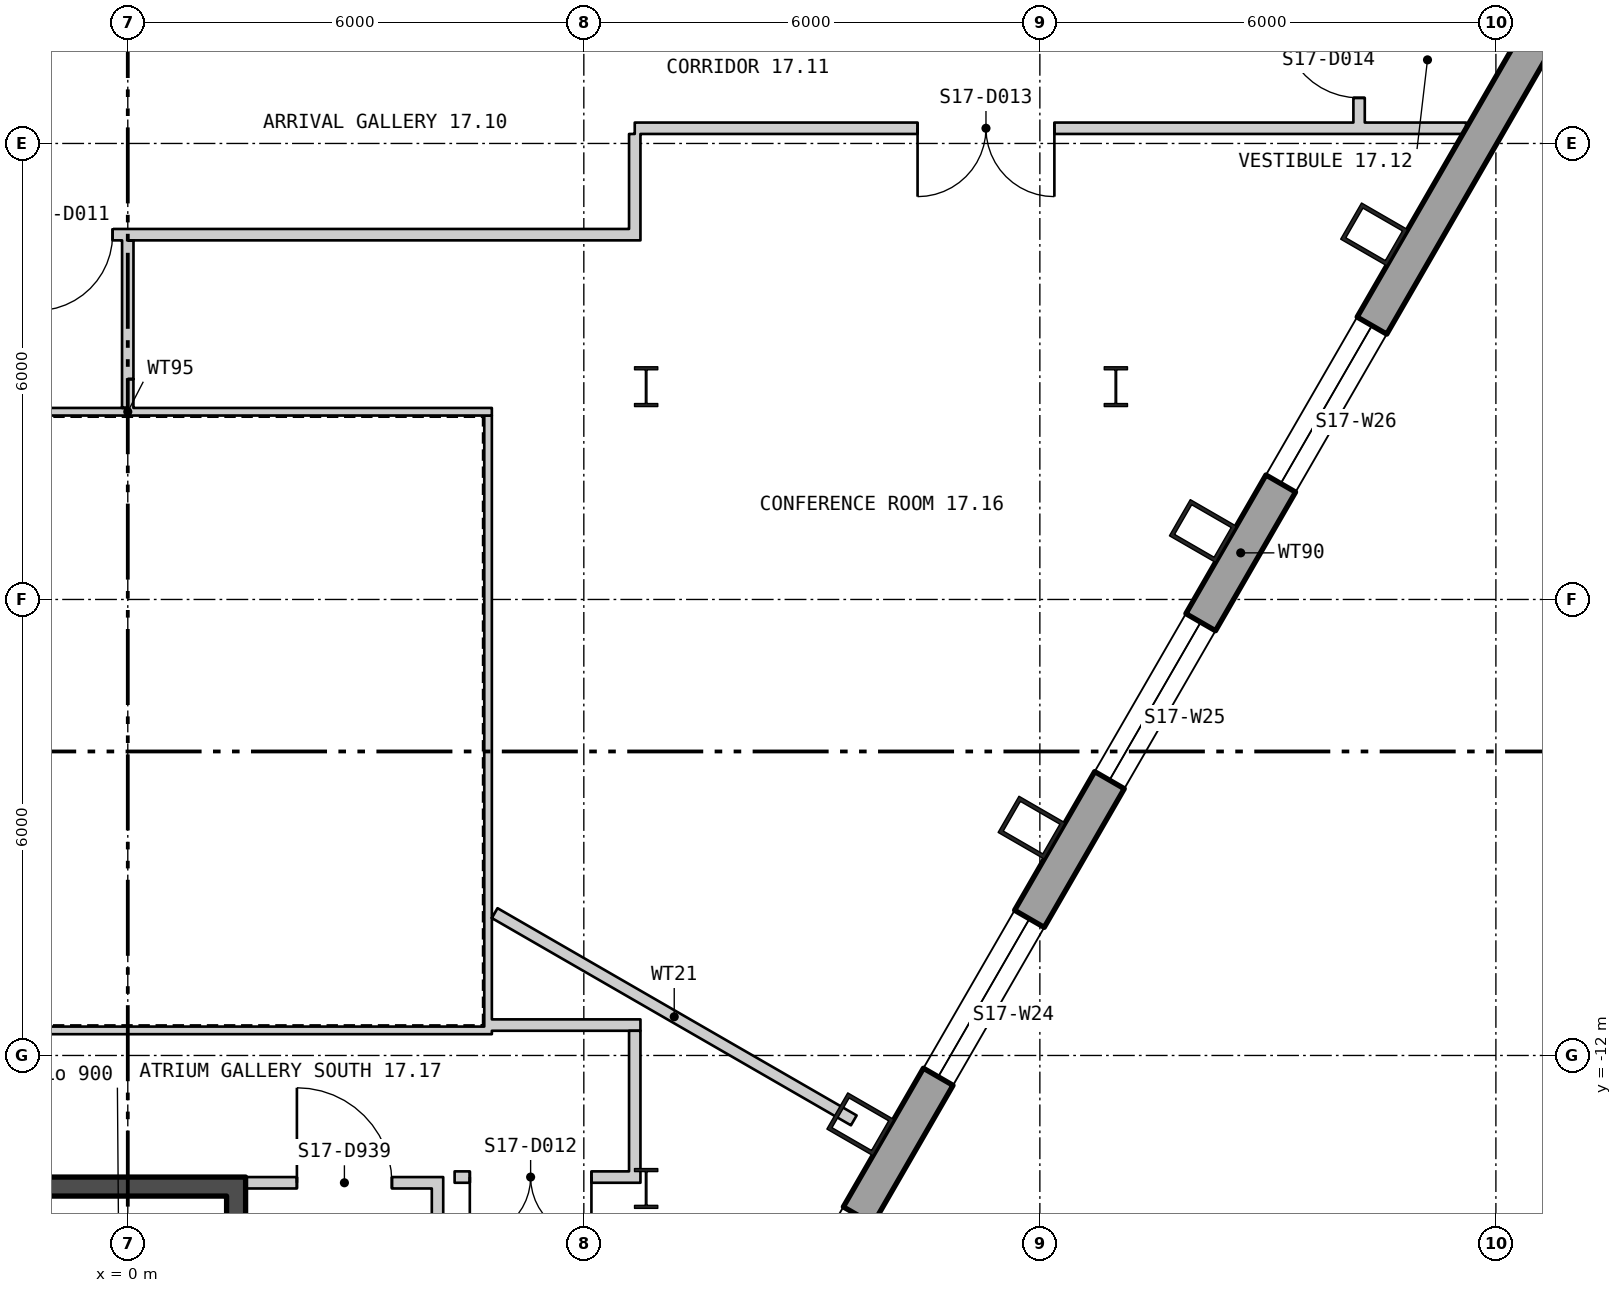
"""IFC4 building model, lengths in metres.
Left out: names, types, materials, properties, quantities, classifications, styles, units other than length and angle.
Written with IfcOpenShell. Run it as: python <this file> out.ifc"""

import sys

from ifc_helpers import new_model, si_unit, direction, frame, frame_2d, origin, origin_2d, place, context, subcontext, project, spatial, polyline, rectangle, hollow_rectangle, i_section, outline, extrude, element, fill, save


model = new_model("IFC4")
c1 = context("Model", 3, precision=1e-05, world=origin(), true_north=direction((0.0, 1.0)))
c2 = subcontext(c1, "Body", "Model", "MODEL_VIEW")
j1 = project(units=[si_unit("LENGTHUNIT", "METRE"), si_unit("PLANEANGLEUNIT", "RADIAN")], contexts=[c1])
p1 = place(None, origin())
s1 = spatial("IfcSite", under=j1, at=p1, CompositionType="ELEMENT")
p2 = place(p1, origin())
s2 = spatial("IfcBuilding", under=s1, at=p2, CompositionType="ELEMENT")
p3 = place(p2, frame((0.0, 0.0, 227.7)))
s3 = spatial("IfcBuildingStorey", under=s2, at=p3, CompositionType="ELEMENT", Elevation=227.7)
for number, where, z_axis, x_axis in (
    (1, (9.638, -12.905, 0.0), (0.0, 0.0, 1.0), (0.5, 0.866, 0.0)),
    (2, (11.891, -9.002, 0.0), (0.0, 0.0, 1.0), (0.5, 0.866, 0.0)),
    (3, (14.145, -5.099, 0.0), (0.0, 0.0, 1.0), (0.5, 0.866, 0.0)),
    (4, (16.398, -1.196, 0.0), (0.0, 0.0, 1.0), (0.5, 0.866, 0.0)),
):
    element("IfcColumn", number, at=place(p3, frame(where, z_axis=z_axis, x_axis=x_axis)), inside=s3, PredefinedType="COLUMN", context=c2, shape_type="SweptSolid", body=[
        extrude(hollow_rectangle(XDim=0.55, YDim=0.7, WallThickness=0.05, at=origin_2d()), origin(), (0.0, 0.0, 1.0), 3.9),
    ])
for number, where, z_axis, x_axis in (
    (5, (6.82, -3.2, 0.0), (0.0, 0.0, 1.0), (1.0, 0.0, 0.0)),
    (6, (6.82, -13.75, 0.0), (0.0, 0.0, 1.0), (1.0, 0.0, 0.0)),
    (7, (13.0, -3.2, 0.0), (0.0, 0.0, 1.0), (1.0, 0.0, 0.0)),
):
    element("IfcColumn", number, at=place(p3, frame(where, z_axis=z_axis, x_axis=x_axis)), inside=s3, PredefinedType="COLUMN", context=c2, shape_type="SweptSolid", body=[
        extrude(i_section(OverallWidth=0.306, OverallDepth=0.524, WebThickness=0.021, FlangeThickness=0.04, at=origin_2d()), origin(), (0.0, 0.0, 1.0), 3.9),
    ])
p4 = place(p3, frame((3.21, -25.189, -0.18), z_axis=(0.0, 0.0, 1.0), x_axis=(0.499999194392, 0.866025868902, 0.0)))
e8 = element("IfcWall", 8, at=p4, inside=s3, PredefinedType="SOLIDWALL", context=c2, shape_type="SweptSolid", body=[
    extrude(outline(polyline([(-0.13, -0.225), (45.86, -0.225), (45.6, 0.225), (0.13, 0.225), (-0.13, -0.225)])), origin(), (0.0, 0.0, 1.0), 3.68),
])
p5 = place(p4, frame((1.424, 0.0, 1.08)))
e9 = element("IfcOpeningElement", 9, at=p5, cuts=e8, PredefinedType="OPENING", context=c2, shape_type="SweptSolid", body=[
    extrude(rectangle(XDim=2.4, YDim=2.0, at=frame_2d((1.2, 1.0))), frame((0.0, 0.235, 0.0), z_axis=(0.0, -1.0, 0.0), x_axis=(1.0, 0.0, 0.0)), (0.0, 0.0, 1.0), 0.47),
])
p6 = place(p4, frame((5.892, 0.0, 1.08)))
e10 = element("IfcOpeningElement", 10, at=p6, cuts=e8, PredefinedType="OPENING", context=c2, shape_type="SweptSolid", body=[
    extrude(rectangle(XDim=2.4, YDim=2.0, at=frame_2d((1.2, 1.0))), frame((0.0, 0.235, 0.0), z_axis=(0.0, -1.0, 0.0), x_axis=(1.0, 0.0, 0.0)), (0.0, 0.0, 1.0), 0.47),
])
p7 = place(p4, frame((10.399, 0.0, 1.08)))
e11 = element("IfcOpeningElement", 11, at=p7, cuts=e8, PredefinedType="OPENING", context=c2, shape_type="SweptSolid", body=[
    extrude(rectangle(XDim=2.4, YDim=2.0, at=frame_2d((1.2, 1.0))), frame((0.0, 0.235, 0.0), z_axis=(0.0, -1.0, 0.0), x_axis=(1.0, 0.0, 0.0)), (0.0, 0.0, 1.0), 0.47),
])
p8 = place(p4, frame((14.905, 0.0, 1.08)))
e12 = element("IfcOpeningElement", 12, at=p8, cuts=e8, PredefinedType="OPENING", context=c2, shape_type="SweptSolid", body=[
    extrude(rectangle(XDim=2.4, YDim=2.0, at=frame_2d((1.2, 1.0))), frame((0.0, 0.235, 0.0), z_axis=(0.0, -1.0, 0.0), x_axis=(1.0, 0.0, 0.0)), (0.0, 0.0, 1.0), 0.47),
])
p9 = place(p4, frame((19.412, 0.0, 1.08)))
e13 = element("IfcOpeningElement", 13, at=p9, cuts=e8, PredefinedType="OPENING", context=c2, shape_type="SweptSolid", body=[
    extrude(rectangle(XDim=2.4, YDim=2.0, at=frame_2d((1.2, 1.0))), frame((0.0, 0.235, 0.0), z_axis=(0.0, -1.0, 0.0), x_axis=(1.0, 0.0, 0.0)), (0.0, 0.0, 1.0), 0.47),
])
p10 = place(p4, frame((23.918, 0.0, 1.08)))
e14 = element("IfcOpeningElement", 14, at=p10, cuts=e8, PredefinedType="OPENING", context=c2, shape_type="SweptSolid", body=[
    extrude(rectangle(XDim=2.4, YDim=2.0, at=frame_2d((1.2, 1.0))), frame((0.0, 0.235, 0.0), z_axis=(0.0, -1.0, 0.0), x_axis=(1.0, 0.0, 0.0)), (0.0, 0.0, 1.0), 0.47),
])
p11 = place(p4, frame((32.932, 0.0, 1.08)))
e15 = element("IfcOpeningElement", 15, at=p11, cuts=e8, PredefinedType="OPENING", context=c2, shape_type="SweptSolid", body=[
    extrude(rectangle(XDim=2.4, YDim=2.0, at=frame_2d((1.2, 1.0))), frame((0.0, 0.235, 0.0), z_axis=(0.0, -1.0, 0.0), x_axis=(1.0, 0.0, 0.0)), (0.0, 0.0, 1.0), 0.47),
])
p12 = place(p4, frame((37.438, 0.0, 1.08)))
e16 = element("IfcOpeningElement", 16, at=p12, cuts=e8, PredefinedType="OPENING", context=c2, shape_type="SweptSolid", body=[
    extrude(rectangle(XDim=2.4, YDim=2.0, at=frame_2d((1.2, 1.0))), frame((0.0, 0.235, 0.0), z_axis=(0.0, -1.0, 0.0), x_axis=(1.0, 0.0, 0.0)), (0.0, 0.0, 1.0), 0.47),
])
p13 = place(p4, frame((41.907, 0.0, 1.08)))
e17 = element("IfcOpeningElement", 17, at=p13, cuts=e8, PredefinedType="OPENING", context=c2, shape_type="SweptSolid", body=[
    extrude(rectangle(XDim=2.4, YDim=2.0, at=frame_2d((1.2, 1.0))), frame((0.0, 0.235, 0.0), z_axis=(0.0, -1.0, 0.0), x_axis=(1.0, 0.0, 0.0)), (0.0, 0.0, 1.0), 0.47),
])
p14 = place(p3, frame((-4.79, -11.67, 0.0), z_axis=(0.0, 0.0, 1.0), x_axis=(1.0, 0.0, 0.0)))
e18 = element("IfcWall", 18, at=p14, inside=s3, PredefinedType="PARTITIONING", context=c2, shape_type="SweptSolid", body=[
    extrude(rectangle(XDim=9.58, YDim=0.1, at=frame_2d((4.79, 0.0))), origin(), (0.0, 0.0, 1.0), 3.7),
])
p15 = place(p3, frame((4.74, -11.62, 0.0), z_axis=(0.0, 0.0, 1.0), x_axis=(0.0, 1.0, 0.0)))
e19 = element("IfcWall", 19, at=p15, inside=s3, PredefinedType="PARTITIONING", context=c2, shape_type="SweptSolid", body=[
    extrude(rectangle(XDim=8.04, YDim=0.1, at=frame_2d((4.02, 0.0))), origin(), (0.0, 0.0, 1.0), 3.7),
])
p16 = place(p3, frame((4.79, -3.53, 0.0), z_axis=(0.0, 0.0, 1.0), x_axis=(-1.0, 0.0, 0.0)))
e20 = element("IfcWall", 20, at=p16, inside=s3, PredefinedType="PARTITIONING", context=c2, shape_type="SweptSolid", body=[
    extrude(rectangle(XDim=9.58, YDim=0.1, at=frame_2d((4.79, 0.0))), origin(), (0.0, 0.0, 1.0), 3.7),
])
p17 = place(p3, frame((1.425, -21.05, 0.0), z_axis=(0.0, 0.0, 1.0), x_axis=(0.0, 1.0, 0.0)))
e21 = element("IfcWall", 21, at=p17, inside=s3, PredefinedType="SHEAR", context=c2, shape_type="SweptSolid", body=[
    extrude(rectangle(XDim=7.2, YDim=0.25, at=frame_2d((3.6, 0.0))), origin(), (0.0, 0.0, 1.0), 3.7),
])
p18 = place(p17, frame((5.89, 0.0, 0.0)))
e22 = element("IfcOpeningElement", 22, at=p18, cuts=e21, PredefinedType="OPENING", context=c2, shape_type="SweptSolid", body=[
    extrude(rectangle(XDim=1.0, YDim=2.1, at=frame_2d((0.5, 1.05))), frame((0.0, 0.135, 0.0), z_axis=(0.0, -1.0, 0.0), x_axis=(1.0, 0.0, 0.0)), (0.0, 0.0, 1.0), 0.27),
])
p19 = place(p3, frame((-1.55, -13.725, 0.0), z_axis=(0.0, 0.0, 1.0), x_axis=(1.0, 0.0, 0.0)))
e23 = element("IfcWall", 23, at=p19, inside=s3, PredefinedType="SHEAR", context=c2, shape_type="SweptSolid", body=[
    extrude(rectangle(XDim=3.1, YDim=0.25, at=frame_2d((1.55, 0.0))), origin(), (0.0, 0.0, 1.0), 3.7),
])
p20 = place(p3, frame((4.075, -16.15, 0.0), z_axis=(0.0, 0.0, 1.0), x_axis=(0.0, 1.0, 0.0)))
e24 = element("IfcWall", 24, at=p20, inside=s3, PredefinedType="PARTITIONING", context=c2, shape_type="SweptSolid", body=[
    extrude(rectangle(XDim=2.4, YDim=0.15, at=frame_2d((1.2, 0.0))), origin(), (0.0, 0.0, 1.0), 3.7),
])
p21 = place(p3, frame((1.55, -13.675, 0.0), z_axis=(0.0, 0.0, 1.0), x_axis=(1.0, 0.0, 0.0)))
e25 = element("IfcWall", 25, at=p21, inside=s3, PredefinedType="PARTITIONING", context=c2, shape_type="SweptSolid", body=[
    extrude(rectangle(XDim=2.6, YDim=0.15, at=frame_2d((1.3, 0.0))), origin(), (0.0, 0.0, 1.0), 2.91),
])
p22 = place(p21, frame((0.675, 0.0, 0.0)))
e26 = element("IfcOpeningElement", 26, at=p22, cuts=e25, PredefinedType="OPENING", context=c2, shape_type="SweptSolid", body=[
    extrude(rectangle(XDim=1.25, YDim=2.1, at=frame_2d((0.625, 1.05))), frame((0.0, 0.085, 0.0), z_axis=(0.0, -1.0, 0.0), x_axis=(1.0, 0.0, 0.0)), (0.0, 0.0, 1.0), 0.17),
])
p23 = place(p3, frame((-4.681, -1.2, 0.0), z_axis=(0.0, 0.0, 1.0), x_axis=(1.0, 0.0, 0.0)))
e27 = element("IfcWall", 27, at=p23, inside=s3, PredefinedType="PARTITIONING", context=c2, shape_type="SweptSolid", body=[
    extrude(rectangle(XDim=11.426, YDim=0.15, at=frame_2d((5.713, 0.0))), origin(), (0.0, 0.0, 1.0), 3.7),
])
p24 = place(p23, frame((3.481, 0.0, 0.0)))
e28 = element("IfcOpeningElement", 28, at=p24, cuts=e27, PredefinedType="OPENING", context=c2, shape_type="SweptSolid", body=[
    extrude(rectangle(XDim=1.0, YDim=2.1, at=frame_2d((0.5, 1.05))), frame((0.0, 0.085, 0.0), z_axis=(0.0, -1.0, 0.0), x_axis=(1.0, 0.0, 0.0)), (0.0, 0.0, 1.0), 0.17),
])
p25 = place(p3, frame((-0.001, -3.48, 0.0), z_axis=(0.0, 0.0, 1.0), x_axis=(0.000526315717, 0.999999861496, 0.0)))
e29 = element("IfcWall", 29, at=p25, inside=s3, PredefinedType="PARTITIONING", context=c2, shape_type="SweptSolid", body=[
    extrude(rectangle(XDim=0.38, YDim=0.15, at=frame_2d((0.19, 0.0))), origin(), (0.0, 0.0, 1.0), 3.7),
])
p26 = place(p3, frame((-0.001, -3.1, 0.0), z_axis=(0.0, 0.0, 1.0), x_axis=(0.000438356122, 0.999999903922, 0.0)))
e30 = element("IfcWall", 30, at=p26, inside=s3, PredefinedType="PARTITIONING", context=c2, shape_type="SweptSolid", body=[
    extrude(rectangle(XDim=1.825, YDim=0.15, at=frame_2d((0.912, 0.0))), origin(), (0.0, 0.0, 1.0), 3.15),
])
p27 = place(p3, frame((4.3, -13.6, 0.0), z_axis=(0.0, 0.0, 1.0), x_axis=(1.0, 0.0, 0.0)))
e31 = element("IfcWall", 31, at=p27, inside=s3, PredefinedType="PARTITIONING", context=c2, shape_type="SweptSolid", body=[
    extrude(rectangle(XDim=2.445, YDim=0.15, at=frame_2d((1.222, 0.0))), origin(), (0.0, 0.0, 1.0), 2.91),
])
p28 = place(p27, frame((0.2, 0.0, 0.0)))
e32 = element("IfcOpeningElement", 32, at=p28, cuts=e31, PredefinedType="OPENING", context=c2, shape_type="SweptSolid", body=[
    extrude(rectangle(XDim=1.6, YDim=2.1, at=frame_2d((0.8, 1.05))), frame((0.0, 0.085, 0.0), z_axis=(0.0, -1.0, 0.0), x_axis=(1.0, 0.0, 0.0)), (0.0, 0.0, 1.0), 0.17),
])
p29 = place(p3, frame((4.79, -11.6, 0.0), z_axis=(0.0, 0.0, 1.0), x_axis=(1.0, 0.0, 0.0)))
e33 = element("IfcWall", 33, at=p29, inside=s3, PredefinedType="PARTITIONING", context=c2, shape_type="SweptSolid", body=[
    extrude(rectangle(XDim=1.955, YDim=0.15, at=frame_2d((0.978, 0.0))), origin(), (0.0, 0.0, 1.0), 3.7),
])
p30 = place(p3, frame((4.827, -10.127, 0.0), z_axis=(0.0, 0.0, 1.0), x_axis=(0.866103179807, -0.499865263774, 0.0)))
e34 = element("IfcWall", 34, at=p30, inside=s3, PredefinedType="PARTITIONING", context=c2, shape_type="SweptSolid", body=[
    extrude(rectangle(XDim=5.455, YDim=0.15, at=frame_2d((2.728, 0.0))), origin(), (0.0, 0.0, 1.0), 3.7),
])
p31 = place(p3, frame((6.67, -13.525, 0.0), z_axis=(0.0, 0.0, 1.0), x_axis=(0.0, 1.0, 0.0)))
e35 = element("IfcWall", 35, at=p31, inside=s3, PredefinedType="PARTITIONING", context=c2, shape_type="SweptSolid", body=[
    extrude(rectangle(XDim=1.85, YDim=0.15, at=frame_2d((0.925, 0.0))), origin(), (0.0, 0.0, 1.0), 3.11),
])
p32 = place(p3, frame((6.67, -1.125, 0.0), z_axis=(0.0, 0.0, 1.0), x_axis=(0.0, 1.0, 0.0)))
e36 = element("IfcWall", 36, at=p32, inside=s3, PredefinedType="PARTITIONING", context=c2, shape_type="SweptSolid", body=[
    extrude(rectangle(XDim=1.25, YDim=0.15, at=frame_2d((0.625, 0.0))), origin(), (0.0, 0.0, 1.0), 3.7),
])
p33 = place(p3, frame((6.67, 0.2, 0.0), z_axis=(0.0, 0.0, 1.0), x_axis=(1.0, 0.0, 0.0)))
e37 = element("IfcWall", 37, at=p33, inside=s3, PredefinedType="PARTITIONING", context=c2, shape_type="SweptSolid", body=[
    extrude(rectangle(XDim=10.938, YDim=0.15, at=frame_2d((5.469, 0.0))), origin(), (0.0, 0.0, 1.0), 3.7),
])
p34 = place(p33, frame((3.721, 0.0, 0.0)))
e38 = element("IfcOpeningElement", 38, at=p34, cuts=e37, PredefinedType="OPENING", context=c2, shape_type="SweptSolid", body=[
    extrude(rectangle(XDim=1.8, YDim=2.1, at=frame_2d((0.9, 1.05))), frame((0.0, 0.085, 0.0), z_axis=(0.0, -1.0, 0.0), x_axis=(1.0, 0.0, 0.0)), (0.0, 0.0, 1.0), 0.17),
])
p35 = place(p3, frame((16.2, 0.275, 0.0), z_axis=(0.0, 0.0, 1.0), x_axis=(0.0, 1.0, 0.0)))
e39 = element("IfcWall", 39, at=p35, inside=s3, PredefinedType="PARTITIONING", context=c2, shape_type="SweptSolid", body=[
    extrude(rectangle(XDim=1.65, YDim=0.15, at=frame_2d((0.825, 0.0))), origin(), (0.0, 0.0, 1.0), 3.7),
])
p36 = place(p35, frame((0.325, 0.0, 0.0)))
e40 = element("IfcOpeningElement", 40, at=p36, cuts=e39, PredefinedType="OPENING", context=c2, shape_type="SweptSolid", body=[
    extrude(rectangle(XDim=1.0, YDim=2.1, at=frame_2d((0.5, 1.05))), frame((0.0, 0.085, 0.0), z_axis=(0.0, -1.0, 0.0), x_axis=(1.0, 0.0, 0.0)), (0.0, 0.0, 1.0), 0.17),
])
p37 = place(p7, origin())
e41 = element("IfcWindow", 41, at=p37, inside=s3, PartitioningType="SINGLE_PANEL", PredefinedType="WINDOW", context=c2, shape_type="SweptSolid", body=[
    extrude(rectangle(XDim=2.4, YDim=2.0, at=frame_2d((1.2, 1.0))), frame((0.0, 0.105, 0.0), z_axis=(0.0, -1.0, 0.0), x_axis=(1.0, 0.0, 0.0)), (0.0, 0.0, 1.0), 0.06),
])
fill(e11, e41)
p38 = place(p8, origin())
e42 = element("IfcWindow", 42, at=p38, inside=s3, PartitioningType="SINGLE_PANEL", PredefinedType="WINDOW", context=c2, shape_type="SweptSolid", body=[
    extrude(rectangle(XDim=2.4, YDim=2.0, at=frame_2d((1.2, 1.0))), frame((0.0, 0.105, 0.0), z_axis=(0.0, -1.0, 0.0), x_axis=(1.0, 0.0, 0.0)), (0.0, 0.0, 1.0), 0.06),
])
fill(e12, e42)
p39 = place(p9, origin())
e43 = element("IfcWindow", 43, at=p39, inside=s3, PartitioningType="SINGLE_PANEL", PredefinedType="WINDOW", context=c2, shape_type="SweptSolid", body=[
    extrude(rectangle(XDim=2.4, YDim=2.0, at=frame_2d((1.2, 1.0))), frame((0.0, 0.105, 0.0), z_axis=(0.0, -1.0, 0.0), x_axis=(1.0, 0.0, 0.0)), (0.0, 0.0, 1.0), 0.06),
])
fill(e13, e43)
p40 = place(p10, origin())
e44 = element("IfcWindow", 44, at=p40, inside=s3, PartitioningType="SINGLE_PANEL", PredefinedType="WINDOW", context=c2, shape_type="SweptSolid", body=[
    extrude(rectangle(XDim=2.4, YDim=2.0, at=frame_2d((1.2, 1.0))), frame((0.0, 0.105, 0.0), z_axis=(0.0, -1.0, 0.0), x_axis=(1.0, 0.0, 0.0)), (0.0, 0.0, 1.0), 0.06),
])
fill(e14, e44)
p41 = place(p22, origin())
e45 = element("IfcDoor", 45, at=p41, inside=s3, OperationType="SINGLE_SWING_RIGHT", PredefinedType="DOOR", context=c2, shape_type="SweptSolid", body=[
    extrude(rectangle(XDim=1.25, YDim=2.1, at=frame_2d((0.625, 1.05))), frame((0.0, 0.025, 0.0), z_axis=(0.0, -1.0, 0.0), x_axis=(1.0, 0.0, 0.0)), (0.0, 0.0, 1.0), 0.05),
])
fill(e26, e45)
p42 = place(p24, origin())
e46 = element("IfcDoor", 46, at=p42, inside=s3, OperationType="SINGLE_SWING_LEFT", PredefinedType="DOOR", context=c2, shape_type="SweptSolid", body=[
    extrude(rectangle(XDim=1.0, YDim=2.1, at=frame_2d((0.5, 1.05))), frame((0.0, 0.025, 0.0), z_axis=(0.0, -1.0, 0.0), x_axis=(1.0, 0.0, 0.0)), (0.0, 0.0, 1.0), 0.05),
])
fill(e28, e46)
p43 = place(p28, origin())
e47 = element("IfcDoor", 47, at=p43, inside=s3, OperationType="DOUBLE_DOOR_SINGLE_SWING", PredefinedType="DOOR", context=c2, shape_type="SweptSolid", body=[
    extrude(rectangle(XDim=1.6, YDim=2.1, at=frame_2d((0.8, 1.05))), frame((0.0, 0.025, 0.0), z_axis=(0.0, -1.0, 0.0), x_axis=(1.0, 0.0, 0.0)), (0.0, 0.0, 1.0), 0.05),
])
fill(e32, e47)
p44 = place(p34, origin())
e48 = element("IfcDoor", 48, at=p44, inside=s3, OperationType="DOUBLE_DOOR_SINGLE_SWING", PredefinedType="DOOR", context=c2, shape_type="SweptSolid", body=[
    extrude(rectangle(XDim=1.8, YDim=2.1, at=frame_2d((0.9, 1.05))), frame((0.0, 0.025, 0.0), z_axis=(0.0, -1.0, 0.0), x_axis=(1.0, 0.0, 0.0)), (0.0, 0.0, 1.0), 0.05),
])
fill(e38, e48)
p45 = place(p36, origin())
e49 = element("IfcDoor", 49, at=p45, inside=s3, OperationType="SINGLE_SWING_LEFT", PredefinedType="DOOR", context=c2, shape_type="SweptSolid", body=[
    extrude(rectangle(XDim=1.0, YDim=2.1, at=frame_2d((0.5, 1.05))), frame((0.0, 0.025, 0.0), z_axis=(0.0, -1.0, 0.0), x_axis=(1.0, 0.0, 0.0)), (0.0, 0.0, 1.0), 0.05),
])
fill(e40, e49)
save(model, sys.argv[1])
